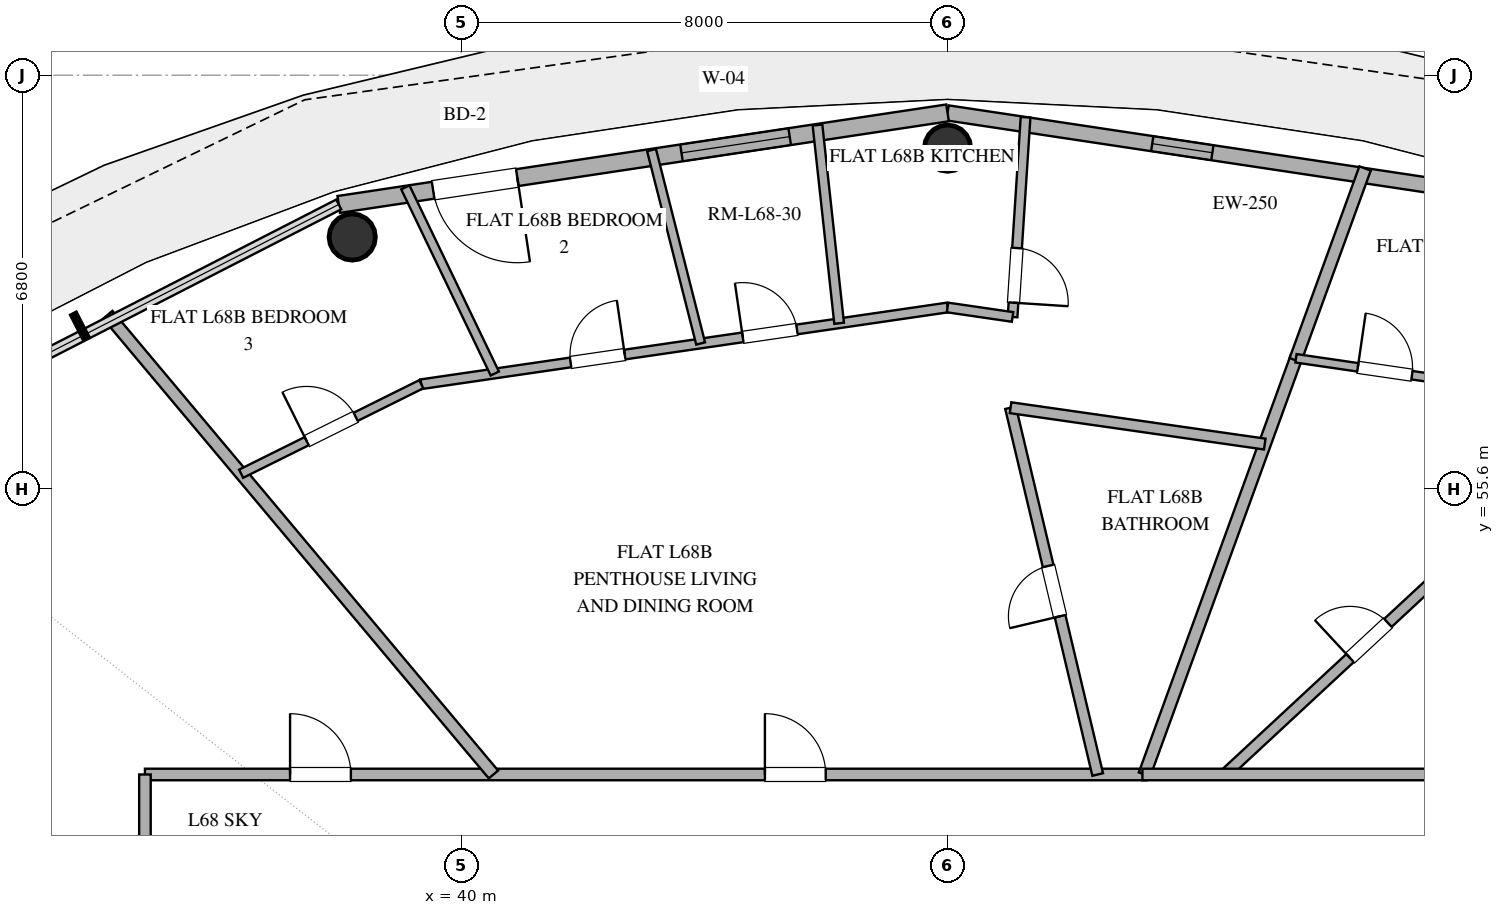
"""IFC4 building model, lengths in metres.
Left out: names, types, materials, properties, quantities, classifications, styles, units other than length and angle.
Written with IfcOpenShell. Run it as: python <this file> out.ifc"""

import sys

from ifc_helpers import new_model, si_unit, direction, frame, frame_2d, origin, origin_2d, place, context, subcontext, project, spatial, rectangle, hollow_circle, extrude, element, fill, save


model = new_model("IFC4")
c1 = context("Model", 3, precision=1e-05, world=origin(), true_north=direction((0.0, 1.0)))
c2 = subcontext(c1, "Body", "Model", "MODEL_VIEW")
j1 = project(units=[si_unit("LENGTHUNIT", "METRE"), si_unit("PLANEANGLEUNIT", "RADIAN")], contexts=[c1])
p1 = place(None, origin())
s1 = spatial("IfcSite", under=j1, at=p1, CompositionType="ELEMENT")
p2 = place(p1, origin())
s2 = spatial("IfcBuilding", under=s1, at=p2, CompositionType="ELEMENT")
p3 = place(p2, frame((0.0, 0.0, 265.8)))
s3 = spatial("IfcBuildingStorey", under=s2, at=p3, CompositionType="ELEMENT", Elevation=265.8)
for number, where, z_axis, x_axis in (
    (1, (48.0, 61.2, 0.0), (0.0, 0.0, 1.0), (1.0, 0.0, 0.0)),
    (2, (38.209, 59.739, 0.0), (0.0, 0.0, 1.0), (1.0, 0.0, 0.0)),
):
    element("IfcColumn", number, at=place(p3, frame(where, z_axis=z_axis, x_axis=x_axis)), inside=s3, PredefinedType="COLUMN", context=c2, shape_type="SweptSolid", body=[
        extrude(hollow_circle(Radius=0.381, WallThickness=0.025, at=origin_2d()), origin(), (0.0, 0.0, 1.0), 3.37),
    ])
p4 = place(p3, frame((58.013, 60.274, 0.0), z_axis=(0.0, 0.0, 1.0), x_axis=(-0.988882522213, 0.148698881169, 0.0)))
e3 = element("IfcWall", 3, at=p4, inside=s3, PredefinedType="SOLIDWALL", context=c2, shape_type="SweptSolid", body=[
    extrude(rectangle(XDim=10.125, YDim=0.25, at=frame_2d((5.062, 0.0))), origin(), (0.0, 0.0, 1.0), 3.37),
])
p5 = place(p4, frame((5.721, 0.0, 0.35)))
e4 = element("IfcOpeningElement", 4, at=p5, cuts=e3, PredefinedType="OPENING", context=c2, shape_type="SweptSolid", body=[
    extrude(rectangle(XDim=1.0, YDim=1.05, at=frame_2d((0.5, 0.525))), frame((0.0, 0.135, 0.0), z_axis=(0.0, -1.0, 0.0), x_axis=(1.0, 0.0, 0.0)), (0.0, 0.0, 1.0), 0.27),
])
p6 = place(p3, frame((48.0, 61.78, 0.0), z_axis=(0.0, 0.0, 1.0), x_axis=(-0.988882522213, -0.148698881169, 0.0)))
e5 = element("IfcWall", 5, at=p6, inside=s3, PredefinedType="SOLIDWALL", context=c2, shape_type="SweptSolid", body=[
    extrude(rectangle(XDim=10.125, YDim=0.28, at=frame_2d((5.062, 0.0))), origin(), (0.0, 0.0, 1.0), 3.37),
])
p7 = place(p6, frame((2.625, 0.0, 0.85)))
e6 = element("IfcOpeningElement", 6, at=p7, cuts=e5, PredefinedType="OPENING", context=c2, shape_type="SweptSolid", body=[
    extrude(rectangle(XDim=1.8, YDim=2.2, at=frame_2d((0.9, 1.1))), frame((0.0, 0.15, 0.0), z_axis=(0.0, -1.0, 0.0), x_axis=(1.0, 0.0, 0.0)), (0.0, 0.0, 1.0), 0.3),
])
p8 = place(p6, frame((7.156, 0.0, 0.0)))
e7 = element("IfcOpeningElement", 7, at=p8, cuts=e5, PredefinedType="OPENING", context=c2, shape_type="SweptSolid", body=[
    extrude(rectangle(XDim=1.4, YDim=2.2, at=frame_2d((0.7, 1.1))), frame((0.0, 0.15, 0.0), z_axis=(0.0, -1.0, 0.0), x_axis=(1.0, 0.0, 0.0)), (0.0, 0.0, 1.0), 0.3),
])
p9 = place(p3, frame((34.8, 50.9, 0.0), z_axis=(0.0, 0.0, 1.0), x_axis=(1.0, 0.0, 0.0)))
e8 = element("IfcWall", 8, at=p9, inside=s3, PredefinedType="PARTITIONING", context=c2, shape_type="SweptSolid", body=[
    extrude(rectangle(XDim=16.473, YDim=0.19, at=frame_2d((8.237, 0.0))), origin(), (0.0, 0.0, 1.0), 2.73),
])
p10 = place(p9, frame((10.196, 0.0, 0.0)))
e9 = element("IfcOpeningElement", 9, at=p10, cuts=e8, PredefinedType="OPENING", context=c2, shape_type="SweptSolid", body=[
    extrude(rectangle(XDim=1.0, YDim=2.2, at=frame_2d((0.5, 1.1))), frame((0.0, 0.105, 0.0), z_axis=(0.0, -1.0, 0.0), x_axis=(1.0, 0.0, 0.0)), (0.0, 0.0, 1.0), 0.21),
])
p11 = place(p9, frame((2.387, 0.0, 0.0)))
e10 = element("IfcOpeningElement", 10, at=p11, cuts=e8, PredefinedType="OPENING", context=c2, shape_type="SweptSolid", body=[
    extrude(rectangle(XDim=1.0, YDim=2.2, at=frame_2d((0.5, 1.1))), frame((0.0, 0.105, 0.0), z_axis=(0.0, -1.0, 0.0), x_axis=(1.0, 0.0, 0.0)), (0.0, 0.0, 1.0), 0.21),
])
p12 = place(p3, frame((52.558, 50.9, 0.0), z_axis=(0.0, 0.0, 1.0), x_axis=(0.732849863846, 0.68039038578, 0.0)))
e11 = element("IfcWall", 11, at=p12, inside=s3, PredefinedType="PLUMBINGWALL", context=c2, shape_type="SweptSolid", body=[
    extrude(rectangle(XDim=6.478, YDim=0.18, at=frame_2d((3.239, 0.0))), origin(), (0.0, 0.0, 1.0), 2.73),
])
p13 = place(p12, frame((2.814, 0.0, 0.0)))
e12 = element("IfcOpeningElement", 12, at=p13, cuts=e11, PredefinedType="OPENING", context=c2, shape_type="SweptSolid", body=[
    extrude(rectangle(XDim=0.85, YDim=2.1, at=frame_2d((0.425, 1.05))), frame((0.0, 0.1, 0.0), z_axis=(0.0, -1.0, 0.0), x_axis=(1.0, 0.0, 0.0)), (0.0, 0.0, 1.0), 0.2),
])
p14 = place(p3, frame((40.532, 50.9, 0.0), z_axis=(0.0, 0.0, 1.0), x_axis=(-0.642777155779, 0.766053214868, 0.0)))
e13 = element("IfcWall", 13, at=p14, inside=s3, PredefinedType="PARTITIONING", context=c2, shape_type="SweptSolid", body=[
    extrude(rectangle(XDim=9.868, YDim=0.2, at=frame_2d((4.934, 0.0))), origin(), (0.0, 0.0, 1.0), 2.73),
])
p15 = place(p3, frame((50.469, 50.9, 0.0), z_axis=(0.0, 0.0, 1.0), x_axis=(-0.231121823084, 0.972924818727, 0.0)))
e14 = element("IfcWall", 14, at=p15, inside=s3, PredefinedType="PLUMBINGWALL", context=c2, shape_type="SweptSolid", body=[
    extrude(rectangle(XDim=6.2, YDim=0.18, at=frame_2d((3.1, 0.0))), origin(), (0.0, 0.0, 1.0), 2.73),
])
p16 = place(p15, frame((2.675, 0.0, 0.0)))
e15 = element("IfcOpeningElement", 15, at=p16, cuts=e14, PredefinedType="OPENING", context=c2, shape_type="SweptSolid", body=[
    extrude(rectangle(XDim=0.85, YDim=2.1, at=frame_2d((0.425, 1.05))), frame((0.0, 0.1, 0.0), z_axis=(0.0, -1.0, 0.0), x_axis=(1.0, 0.0, 0.0)), (0.0, 0.0, 1.0), 0.2),
])
p17 = place(p3, frame((51.239, 50.9, 0.0), z_axis=(0.0, 0.0, 1.0), x_axis=(0.342027045015, 0.939690108748, 0.0)))
e16 = element("IfcWall", 16, at=p17, inside=s3, PredefinedType="PARTITIONING", context=c2, shape_type="SweptSolid", body=[
    extrude(rectangle(XDim=7.316, YDim=0.2, at=frame_2d((3.658, 0.0))), origin(), (0.0, 0.0, 1.0), 2.73),
])
p18 = place(p3, frame((51.205, 50.9, 0.0), z_axis=(0.0, 0.0, 1.0), x_axis=(1.0, 0.0, 0.0)))
e17 = element("IfcWall", 17, at=p18, inside=s3, PredefinedType="PARTITIONING", context=c2, shape_type="SweptSolid", body=[
    extrude(rectangle(XDim=9.995, YDim=0.19, at=frame_2d((4.998, 0.0))), origin(), (0.0, 0.0, 1.0), 2.73),
])
p19 = place(p3, frame((34.8, 46.128, 0.0), z_axis=(0.0, 0.0, 1.0), x_axis=(0.0, 1.0, 0.0)))
e18 = element("IfcWall", 18, at=p19, inside=s3, PredefinedType="PARTITIONING", context=c2, shape_type="SweptSolid", body=[
    extrude(rectangle(XDim=4.771, YDim=0.19, at=frame_2d((2.386, 0.0))), origin(), (0.0, 0.0, 1.0), 2.73),
])
p20 = place(p3, frame((49.036, 56.932, 0.0), z_axis=(0.0, 0.0, 1.0), x_axis=(0.989927514161, -0.141575127434, 0.0)))
e19 = element("IfcWall", 19, at=p20, inside=s3, PredefinedType="PLUMBINGWALL", context=c2, shape_type="SweptSolid", body=[
    extrude(rectangle(XDim=4.223, YDim=0.18, at=frame_2d((2.112, 0.0))), origin(), (0.0, 0.0, 1.0), 2.73),
])
p21 = place(p3, frame((39.345, 57.318, 0.0), z_axis=(0.0, 0.0, 1.0), x_axis=(0.989536136377, 0.144285254977, 0.0)))
e20 = element("IfcWall", 20, at=p21, inside=s3, PredefinedType="PLUMBINGWALL", context=c2, shape_type="SweptSolid", body=[
    extrude(rectangle(XDim=8.746, YDim=0.16, at=frame_2d((4.373, 0.0))), origin(), (0.0, 0.0, 1.0), 2.73),
])
p22 = place(p21, frame((2.481, 0.0, 0.0)))
e21 = element("IfcOpeningElement", 21, at=p22, cuts=e20, PredefinedType="OPENING", context=c2, shape_type="SweptSolid", body=[
    extrude(rectangle(XDim=0.9, YDim=2.1, at=frame_2d((0.45, 1.05))), frame((0.0, 0.09, 0.0), z_axis=(0.0, -1.0, 0.0), x_axis=(1.0, 0.0, 0.0)), (0.0, 0.0, 1.0), 0.18),
])
p23 = place(p21, frame((5.344, 0.0, 0.0)))
e22 = element("IfcOpeningElement", 22, at=p23, cuts=e20, PredefinedType="OPENING", context=c2, shape_type="SweptSolid", body=[
    extrude(rectangle(XDim=0.9, YDim=2.1, at=frame_2d((0.45, 1.05))), frame((0.0, 0.09, 0.0), z_axis=(0.0, -1.0, 0.0), x_axis=(1.0, 0.0, 0.0)), (0.0, 0.0, 1.0), 0.18),
])
p24 = place(p3, frame((40.554, 57.494, 0.0), z_axis=(0.0, 0.0, 1.0), x_axis=(-0.433125990105, 0.901333388206, 0.0)))
e23 = element("IfcWall", 23, at=p24, inside=s3, PredefinedType="PARTITIONING", context=c2, shape_type="SweptSolid", body=[
    extrude(rectangle(XDim=3.396, YDim=0.15, at=frame_2d((1.698, 0.0))), origin(), (0.0, 0.0, 1.0), 2.73),
])
p25 = place(p3, frame((54.867, 60.866, 0.0), z_axis=(0.0, 0.0, 1.0), x_axis=(-0.342000121366, -0.939699907942, 0.0)))
e24 = element("IfcWall", 24, at=p25, inside=s3, PredefinedType="PARTITIONING", context=c2, shape_type="SweptSolid", body=[
    extrude(rectangle(XDim=3.355, YDim=0.2, at=frame_2d((1.678, 0.0))), origin(), (0.0, 0.0, 1.0), 2.73),
])
p26 = place(p3, frame((36.382, 55.846, 0.0), z_axis=(0.0, 0.0, 1.0), x_axis=(0.895604637563, 0.444850911177, 0.0)))
e25 = element("IfcWall", 25, at=p26, inside=s3, PredefinedType="PARTITIONING", context=c2, shape_type="SweptSolid", body=[
    extrude(rectangle(XDim=3.309, YDim=0.15, at=frame_2d((1.654, 0.0))), origin(), (0.0, 0.0, 1.0), 2.73),
])
p27 = place(p26, frame((1.204, 0.0, 0.0)))
e26 = element("IfcOpeningElement", 26, at=p27, cuts=e25, PredefinedType="OPENING", context=c2, shape_type="SweptSolid", body=[
    extrude(rectangle(XDim=0.9, YDim=2.1, at=frame_2d((0.45, 1.05))), frame((0.0, 0.085, 0.0), z_axis=(0.0, -1.0, 0.0), x_axis=(1.0, 0.0, 0.0)), (0.0, 0.0, 1.0), 0.17),
])
p28 = place(p3, frame((49.283, 61.708, 0.0), z_axis=(0.0, 0.0, 1.0), x_axis=(-0.064987599341, -0.997886071619, 0.0)))
e27 = element("IfcWall", 27, at=p28, inside=s3, PredefinedType="PLUMBINGWALL", context=c2, shape_type="SweptSolid", body=[
    extrude(rectangle(XDim=3.291, YDim=0.16, at=frame_2d((1.646, 0.0))), origin(), (0.0, 0.0, 1.0), 2.73),
])
p29 = place(p28, frame((2.156, 0.0, 0.0)))
e28 = element("IfcOpeningElement", 28, at=p29, cuts=e27, PredefinedType="OPENING", context=c2, shape_type="SweptSolid", body=[
    extrude(rectangle(XDim=0.9, YDim=2.1, at=frame_2d((0.45, 1.05))), frame((0.0, 0.09, 0.0), z_axis=(0.0, -1.0, 0.0), x_axis=(1.0, 0.0, 0.0)), (0.0, 0.0, 1.0), 0.18),
])
p30 = place(p3, frame((43.132, 61.169, 0.0), z_axis=(0.0, 0.0, 1.0), x_axis=(0.246087289335, -0.969247670117, 0.0)))
e29 = element("IfcWall", 29, at=p30, inside=s3, PredefinedType="PARTITIONING", context=c2, shape_type="SweptSolid", body=[
    extrude(rectangle(XDim=3.282, YDim=0.15, at=frame_2d((1.641, 0.0))), origin(), (0.0, 0.0, 1.0), 2.73),
])
p31 = place(p3, frame((46.217, 58.32, 0.0), z_axis=(0.0, 0.0, 1.0), x_axis=(-0.108559889868, 0.994089910577, 0.0)))
e30 = element("IfcWall", 30, at=p31, inside=s3, PredefinedType="PLUMBINGWALL", context=c2, shape_type="SweptSolid", body=[
    extrude(rectangle(XDim=3.279, YDim=0.16, at=frame_2d((1.639, 0.0))), origin(), (0.0, 0.0, 1.0), 2.73),
])
p32 = place(p3, frame((53.73, 57.744, 0.0), z_axis=(0.0, 0.0, 1.0), x_axis=(0.989530523264, -0.144323745545, 0.0)))
e31 = element("IfcWall", 31, at=p32, inside=s3, PredefinedType="PARTITIONING", context=c2, shape_type="SweptSolid", body=[
    extrude(rectangle(XDim=2.955, YDim=0.14, at=frame_2d((1.478, 0.0))), origin(), (0.0, 0.0, 1.0), 2.73),
])
p33 = place(p32, frame((1.028, 0.0, 0.0)))
e32 = element("IfcOpeningElement", 32, at=p33, cuts=e31, PredefinedType="OPENING", context=c2, shape_type="SweptSolid", body=[
    extrude(rectangle(XDim=0.9, YDim=2.1, at=frame_2d((0.45, 1.05))), frame((0.0, 0.08, 0.0), z_axis=(0.0, -1.0, 0.0), x_axis=(1.0, 0.0, 0.0)), (0.0, 0.0, 1.0), 0.16),
])
p34 = place(p3, frame((49.069, 58.424, 0.0), z_axis=(0.0, 0.0, 1.0), x_axis=(-0.989520204584, 0.144394476074, 0.0)))
e33 = element("IfcWall", 33, at=p34, inside=s3, PredefinedType="PLUMBINGWALL", context=c2, shape_type="SweptSolid", body=[
    extrude(rectangle(XDim=1.08, YDim=0.16, at=frame_2d((0.54, 0.0))), origin(), (0.0, 0.0, 1.0), 2.73),
])
p35 = place(p7, origin())
e34 = element("IfcWindow", 34, at=p35, inside=s3, PartitioningType="SINGLE_PANEL", PredefinedType="WINDOW", context=c2, shape_type="SweptSolid", body=[
    extrude(rectangle(XDim=1.8, YDim=2.2, at=frame_2d((0.9, 1.1))), frame((0.0, 0.03, 0.0), z_axis=(0.0, -1.0, 0.0), x_axis=(1.0, 0.0, 0.0)), (0.0, 0.0, 1.0), 0.06),
])
fill(e6, e34)
p36 = place(p8, origin())
e35 = element("IfcDoor", 35, at=p36, inside=s3, OperationType="SINGLE_SWING_LEFT", PredefinedType="DOOR", context=c2, shape_type="SweptSolid", body=[
    extrude(rectangle(XDim=1.4, YDim=2.2, at=frame_2d((0.7, 1.1))), frame((0.0, 0.025, 0.0), z_axis=(0.0, -1.0, 0.0), x_axis=(1.0, 0.0, 0.0)), (0.0, 0.0, 1.0), 0.05),
])
fill(e7, e35)
p37 = place(p5, origin())
e36 = element("IfcWindow", 36, at=p37, inside=s3, PartitioningType="SINGLE_PANEL", PredefinedType="WINDOW", context=c2, shape_type="SweptSolid", body=[
    extrude(rectangle(XDim=1.0, YDim=1.05, at=frame_2d((0.5, 0.525))), frame((0.0, 0.03, 0.0), z_axis=(0.0, -1.0, 0.0), x_axis=(1.0, 0.0, 0.0)), (0.0, 0.0, 1.0), 0.06),
])
fill(e4, e36)
p38 = place(p10, origin())
e37 = element("IfcDoor", 37, at=p38, inside=s3, OperationType="SINGLE_SWING_LEFT", PredefinedType="DOOR", context=c2, shape_type="SweptSolid", body=[
    extrude(rectangle(XDim=1.0, YDim=2.2, at=frame_2d((0.5, 1.1))), frame((0.0, 0.025, 0.0), z_axis=(0.0, -1.0, 0.0), x_axis=(1.0, 0.0, 0.0)), (0.0, 0.0, 1.0), 0.05),
])
fill(e9, e37)
p39 = place(p11, origin())
e38 = element("IfcDoor", 38, at=p39, inside=s3, OperationType="SINGLE_SWING_LEFT", PredefinedType="DOOR", context=c2, shape_type="SweptSolid", body=[
    extrude(rectangle(XDim=1.0, YDim=2.2, at=frame_2d((0.5, 1.1))), frame((0.0, 0.025, 0.0), z_axis=(0.0, -1.0, 0.0), x_axis=(1.0, 0.0, 0.0)), (0.0, 0.0, 1.0), 0.05),
])
fill(e10, e38)
p40 = place(p13, origin())
e39 = element("IfcDoor", 39, at=p40, inside=s3, OperationType="SINGLE_SWING_LEFT", PredefinedType="DOOR", context=c2, shape_type="SweptSolid", body=[
    extrude(rectangle(XDim=0.85, YDim=2.1, at=frame_2d((0.425, 1.05))), frame((0.0, 0.025, 0.0), z_axis=(0.0, -1.0, 0.0), x_axis=(1.0, 0.0, 0.0)), (0.0, 0.0, 1.0), 0.05),
])
fill(e12, e39)
p41 = place(p16, origin())
e40 = element("IfcDoor", 40, at=p41, inside=s3, OperationType="SINGLE_SWING_LEFT", PredefinedType="DOOR", context=c2, shape_type="SweptSolid", body=[
    extrude(rectangle(XDim=0.85, YDim=2.1, at=frame_2d((0.425, 1.05))), frame((0.0, 0.025, 0.0), z_axis=(0.0, -1.0, 0.0), x_axis=(1.0, 0.0, 0.0)), (0.0, 0.0, 1.0), 0.05),
])
fill(e15, e40)
p42 = place(p22, origin())
e41 = element("IfcDoor", 41, at=p42, inside=s3, OperationType="SINGLE_SWING_RIGHT", PredefinedType="DOOR", context=c2, shape_type="SweptSolid", body=[
    extrude(rectangle(XDim=0.9, YDim=2.1, at=frame_2d((0.45, 1.05))), frame((0.0, 0.025, 0.0), z_axis=(0.0, -1.0, 0.0), x_axis=(1.0, 0.0, 0.0)), (0.0, 0.0, 1.0), 0.05),
])
fill(e21, e41)
p43 = place(p23, origin())
e42 = element("IfcDoor", 42, at=p43, inside=s3, OperationType="SINGLE_SWING_LEFT", PredefinedType="DOOR", context=c2, shape_type="SweptSolid", body=[
    extrude(rectangle(XDim=0.9, YDim=2.1, at=frame_2d((0.45, 1.05))), frame((0.0, 0.025, 0.0), z_axis=(0.0, -1.0, 0.0), x_axis=(1.0, 0.0, 0.0)), (0.0, 0.0, 1.0), 0.05),
])
fill(e22, e42)
p44 = place(p27, origin())
e43 = element("IfcDoor", 43, at=p44, inside=s3, OperationType="SINGLE_SWING_LEFT", PredefinedType="DOOR", context=c2, shape_type="SweptSolid", body=[
    extrude(rectangle(XDim=0.9, YDim=2.1, at=frame_2d((0.45, 1.05))), frame((0.0, 0.025, 0.0), z_axis=(0.0, -1.0, 0.0), x_axis=(1.0, 0.0, 0.0)), (0.0, 0.0, 1.0), 0.05),
])
fill(e26, e43)
p45 = place(p29, origin())
e44 = element("IfcDoor", 44, at=p45, inside=s3, OperationType="SINGLE_SWING_RIGHT", PredefinedType="DOOR", context=c2, shape_type="SweptSolid", body=[
    extrude(rectangle(XDim=0.9, YDim=2.1, at=frame_2d((0.45, 1.05))), frame((0.0, 0.025, 0.0), z_axis=(0.0, -1.0, 0.0), x_axis=(1.0, 0.0, 0.0)), (0.0, 0.0, 1.0), 0.05),
])
fill(e28, e44)
p46 = place(p33, origin())
e45 = element("IfcDoor", 45, at=p46, inside=s3, OperationType="SINGLE_SWING_LEFT", PredefinedType="DOOR", context=c2, shape_type="SweptSolid", body=[
    extrude(rectangle(XDim=0.9, YDim=2.1, at=frame_2d((0.45, 1.05))), frame((0.0, 0.025, 0.0), z_axis=(0.0, -1.0, 0.0), x_axis=(1.0, 0.0, 0.0)), (0.0, 0.0, 1.0), 0.05),
])
fill(e32, e45)
save(model, sys.argv[1])
